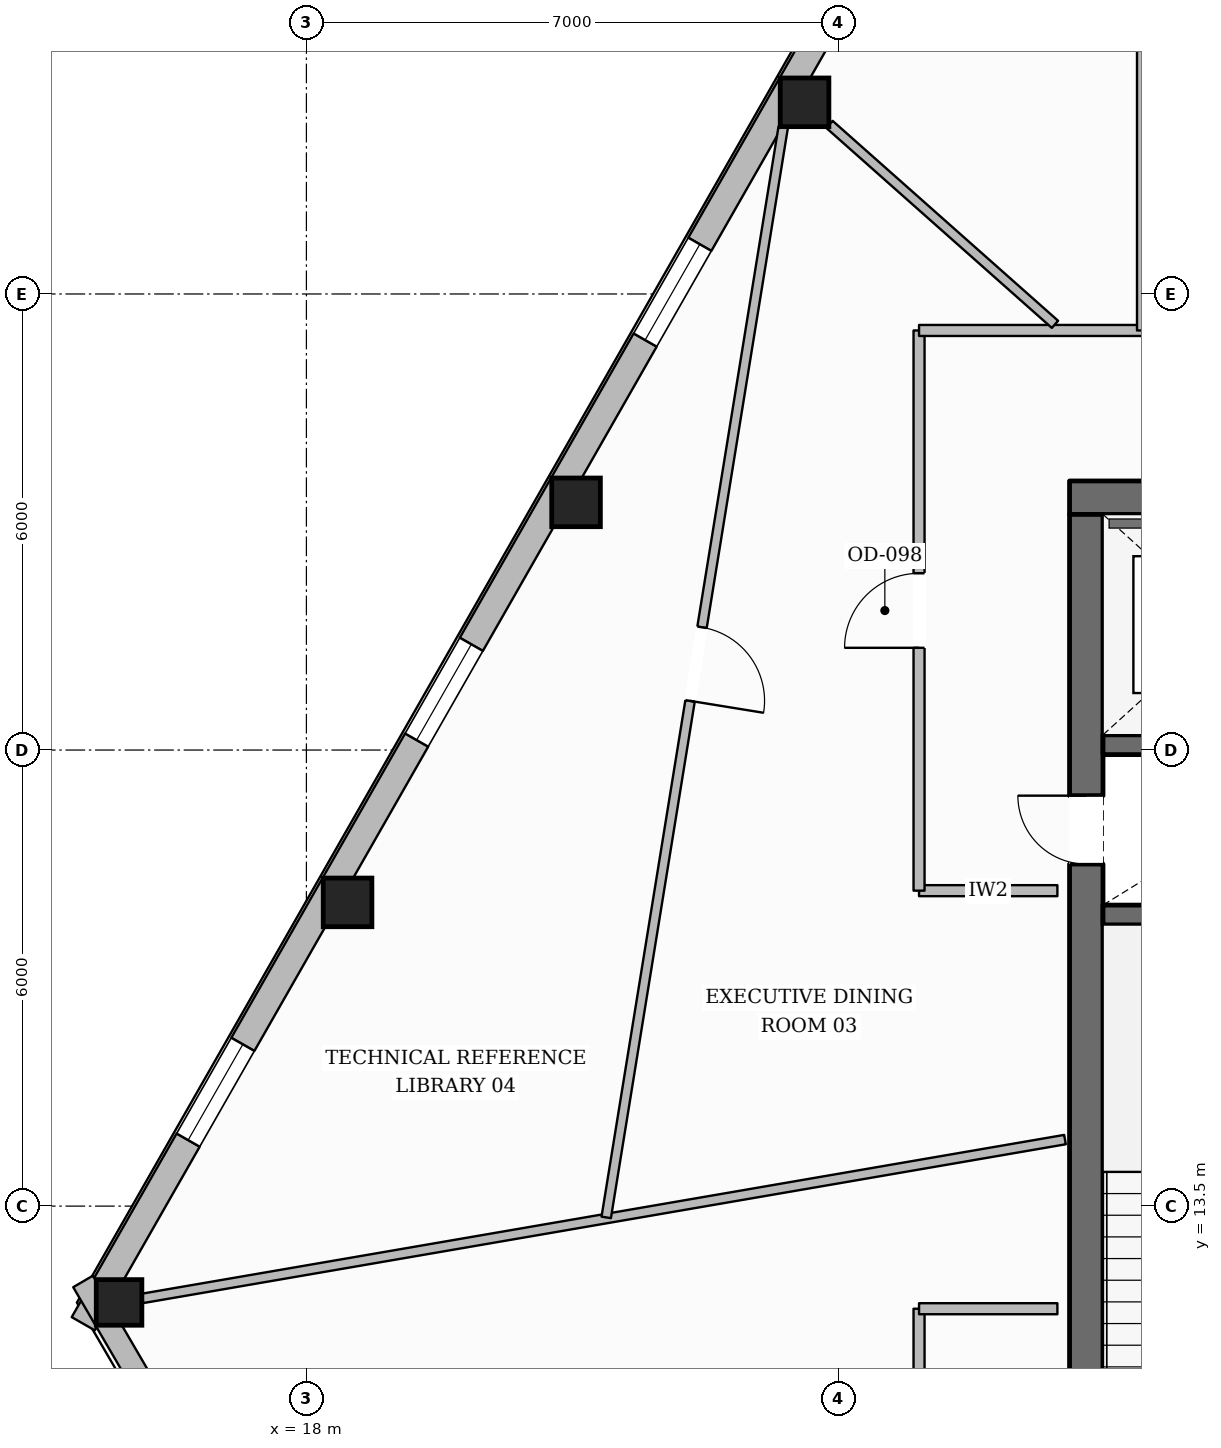
"""IFC4 building model, lengths in metres.
Left out: names, types, materials, properties, quantities, classifications, styles, units other than length and angle.
Written with IfcOpenShell. Run it as: python <this file> out.ifc"""

import sys

from ifc_helpers import new_model, si_unit, direction, frame, frame_2d, origin, origin_2d, place, context, subcontext, project, spatial, rectangle, hollow_rectangle, extrude, element, fill, save


model = new_model("IFC4")
c1 = context("Model", 3, precision=1e-05, world=origin(), true_north=direction((0.0, 1.0)))
c2 = subcontext(c1, "Body", "Model", "MODEL_VIEW")
j1 = project(units=[si_unit("LENGTHUNIT", "METRE"), si_unit("PLANEANGLEUNIT", "RADIAN")], contexts=[c1])
p1 = place(None, origin())
s1 = spatial("IfcSite", under=j1, at=p1, CompositionType="ELEMENT")
p2 = place(p1, origin())
s2 = spatial("IfcBuilding", under=s1, at=p2, CompositionType="ELEMENT")
p3 = place(p2, frame((0.0, 0.0, 180.4)))
s3 = spatial("IfcBuildingStorey", under=s2, at=p3, CompositionType="ELEMENT", Elevation=180.4)
p4 = place(p3, frame((28.04, 22.82, 0.0), z_axis=(0.0, 0.0, 1.0), x_axis=(1.0, 0.0, 0.0)))
e1 = element("IfcWall", 1, at=p4, inside=s3, PredefinedType="SOLIDWALL", context=c2, shape_type="SweptSolid", body=[
    extrude(rectangle(XDim=19.92, YDim=0.44, at=frame_2d((9.96, 0.0))), origin(), (0.0, 0.0, 1.0), 3.6),
])
p5 = place(p4, frame((6.235, 0.0, 0.0)))
e2 = element("IfcOpeningElement", 2, at=p5, cuts=e1, PredefinedType="OPENING", context=c2, shape_type="SweptSolid", body=[
    extrude(rectangle(XDim=1.05, YDim=2.15, at=frame_2d((0.525, 1.075))), frame((0.0, 0.23, 0.0), z_axis=(0.0, -1.0, 0.0), x_axis=(1.0, 0.0, 0.0)), (0.0, 0.0, 1.0), 0.46),
])
p6 = place(p4, frame((12.635, 0.0, 0.0)))
e3 = element("IfcOpeningElement", 3, at=p6, cuts=e1, PredefinedType="OPENING", context=c2, shape_type="SweptSolid", body=[
    extrude(rectangle(XDim=1.05, YDim=2.15, at=frame_2d((0.525, 1.075))), frame((0.0, 0.23, 0.0), z_axis=(0.0, -1.0, 0.0), x_axis=(1.0, 0.0, 0.0)), (0.0, 0.0, 1.0), 0.46),
])
p7 = place(p3, frame((28.26, 9.6, 0.0), z_axis=(0.0, 0.0, 1.0), x_axis=(0.0, 1.0, 0.0)))
e4 = element("IfcWall", 4, at=p7, inside=s3, PredefinedType="SOLIDWALL", context=c2, shape_type="SweptSolid", body=[
    extrude(rectangle(XDim=13.0, YDim=0.44, at=frame_2d((6.5, 0.0))), origin(), (0.0, 0.0, 1.0), 3.6),
])
p8 = place(p7, frame((0.2, 0.0, 0.0)))
e5 = element("IfcOpeningElement", 5, at=p8, cuts=e4, PredefinedType="OPENING", context=c2, shape_type="SweptSolid", body=[
    extrude(rectangle(XDim=1.1, YDim=2.15, at=frame_2d((0.55, 1.075))), frame((0.0, 0.23, 0.0), z_axis=(0.0, -1.0, 0.0), x_axis=(1.0, 0.0, 0.0)), (0.0, 0.0, 1.0), 0.46),
])
p9 = place(p7, frame((8.4, 0.0, 0.0)))
e6 = element("IfcOpeningElement", 6, at=p9, cuts=e4, PredefinedType="OPENING", context=c2, shape_type="SweptSolid", body=[
    extrude(rectangle(XDim=0.9, YDim=2.1, at=frame_2d((0.45, 1.05))), frame((0.0, 0.23, 0.0), z_axis=(0.0, -1.0, 0.0), x_axis=(1.0, 0.0, 0.0)), (0.0, 0.0, 1.0), 0.46),
])
for number, where, z_axis, x_axis in (
    (7, (28.48, 17.33, 0.0), (0.0, 0.0, 1.0), (1.0, 0.0, 0.0)),
    (8, (28.48, 19.57, 0.0), (0.0, 0.0, 1.0), (1.0, 0.0, 0.0)),
):
    element("IfcWall", number, at=place(p3, frame(where, z_axis=z_axis, x_axis=x_axis)), inside=s3, PredefinedType="SHEAR", context=c2, shape_type="SweptSolid", body=[
        extrude(rectangle(XDim=3.2, YDim=0.26, at=frame_2d((1.6, 0.0))), origin(), (0.0, 0.0, 1.0), 3.6),
    ])
for number, where, z_axis, x_axis in (
    (9, (24.554, 28.021, 0.0), (0.0, 0.0, 1.0), (1.0, 0.0, 0.0)),
    (10, (21.548, 22.759, 0.0), (0.0, 0.0, 1.0), (1.0, 0.0, 0.0)),
    (11, (18.542, 17.496, 0.0), (0.0, 0.0, 1.0), (1.0, 0.0, 0.0)),
):
    element("IfcColumn", number, at=place(p3, frame(where, z_axis=z_axis, x_axis=x_axis)), inside=s3, PredefinedType="COLUMN", context=c2, shape_type="SweptSolid", body=[
        extrude(hollow_rectangle(XDim=0.64, YDim=0.64, WallThickness=0.028, at=origin_2d()), origin(), (0.0, 0.0, 1.0), 3.6),
    ])
p10 = place(p3, frame((15.535, 12.233, 0.0), z_axis=(0.0, 0.0, 1.0), x_axis=(1.0, 0.0, 0.0)))
e12 = element("IfcColumn", 12, at=p10, inside=s3, PredefinedType="COLUMN", context=c2, shape_type="SweptSolid", body=[
    extrude(hollow_rectangle(XDim=0.6, YDim=0.6, WallThickness=0.028, at=origin_2d()), origin(), (0.0, 0.0, 1.0), 3.6),
])
p11 = place(p3, frame((15.064, 11.953, 0.0), z_axis=(0.0, 0.0, 1.0), x_axis=(0.495993114815, 0.86832645362, 0.0)))
e13 = element("IfcWall", 13, at=p11, inside=s3, PredefinedType="STANDARD", context=c2, shape_type="SweptSolid", body=[
    extrude(rectangle(XDim=37.324, YDim=0.35, at=frame_2d((18.662, 0.0))), origin(), (0.0, 0.0, 1.0), 3.132),
])
p12 = place(p11, frame((33.087, 0.0, 0.65)))
e14 = element("IfcOpeningElement", 14, at=p12, cuts=e13, PredefinedType="OPENING", context=c2, shape_type="SweptSolid", body=[
    extrude(rectangle(XDim=1.45, YDim=1.75, at=frame_2d((0.725, 0.875))), frame((0.0, 0.185, 0.0), z_axis=(0.0, -1.0, 0.0), x_axis=(1.0, 0.0, 0.0)), (0.0, 0.0, 1.0), 0.37),
])
p13 = place(p11, frame((27.026, 0.0, 0.65)))
e15 = element("IfcOpeningElement", 15, at=p13, cuts=e13, PredefinedType="OPENING", context=c2, shape_type="SweptSolid", body=[
    extrude(rectangle(XDim=1.45, YDim=1.75, at=frame_2d((0.725, 0.875))), frame((0.0, 0.185, 0.0), z_axis=(0.0, -1.0, 0.0), x_axis=(1.0, 0.0, 0.0)), (0.0, 0.0, 1.0), 0.37),
])
p14 = place(p11, frame((14.904, 0.0, 0.65)))
e16 = element("IfcOpeningElement", 16, at=p14, cuts=e13, PredefinedType="OPENING", context=c2, shape_type="SweptSolid", body=[
    extrude(rectangle(XDim=1.45, YDim=1.75, at=frame_2d((0.725, 0.875))), frame((0.0, 0.185, 0.0), z_axis=(0.0, -1.0, 0.0), x_axis=(1.0, 0.0, 0.0)), (0.0, 0.0, 1.0), 0.37),
])
p15 = place(p11, frame((8.844, 0.0, 0.65)))
e17 = element("IfcOpeningElement", 17, at=p15, cuts=e13, PredefinedType="OPENING", context=c2, shape_type="SweptSolid", body=[
    extrude(rectangle(XDim=1.45, YDim=1.75, at=frame_2d((0.725, 0.875))), frame((0.0, 0.185, 0.0), z_axis=(0.0, -1.0, 0.0), x_axis=(1.0, 0.0, 0.0)), (0.0, 0.0, 1.0), 0.37),
])
p16 = place(p11, frame((2.782, 0.0, 0.65)))
e18 = element("IfcOpeningElement", 18, at=p16, cuts=e13, PredefinedType="OPENING", context=c2, shape_type="SweptSolid", body=[
    extrude(rectangle(XDim=1.45, YDim=1.75, at=frame_2d((0.725, 0.875))), frame((0.0, 0.185, 0.0), z_axis=(0.0, -1.0, 0.0), x_axis=(1.0, 0.0, 0.0)), (0.0, 0.0, 1.0), 0.37),
])
p17 = place(p3, frame((20.12, 3.839, 0.0), z_axis=(0.0, 0.0, 1.0), x_axis=(-0.503937564299, 0.863740083178, 0.0)))
e19 = element("IfcWall", 19, at=p17, inside=s3, PredefinedType="STANDARD", context=c2, shape_type="SweptSolid", body=[
    extrude(rectangle(XDim=10.038, YDim=0.3, at=frame_2d((5.019, 0.0))), origin(), (0.0, 0.0, 1.0), 3.132),
])
p18 = place(p17, frame((4.494, 0.0, 0.65)))
e20 = element("IfcOpeningElement", 20, at=p18, cuts=e19, PredefinedType="OPENING", context=c2, shape_type="SweptSolid", body=[
    extrude(rectangle(XDim=1.05, YDim=1.7, at=frame_2d((0.525, 0.85))), frame((0.0, 0.16, 0.0), z_axis=(0.0, -1.0, 0.0), x_axis=(1.0, 0.0, 0.0)), (0.0, 0.0, 1.0), 0.32),
])
p19 = place(p3, frame((27.88, 17.65, 0.0), z_axis=(0.0, 0.0, 1.0), x_axis=(-1.0, 0.0, 0.0)))
e21 = element("IfcWall", 21, at=p19, inside=s3, PredefinedType="PARTITIONING", context=c2, shape_type="SweptSolid", body=[
    extrude(rectangle(XDim=1.82, YDim=0.145, at=frame_2d((0.91, 0.0))), origin(), (0.0, 0.0, 1.0), 3.141),
])
p20 = place(p3, frame((26.06, 17.65, 0.0), z_axis=(0.0, 0.0, 1.0), x_axis=(0.0, 1.0, 0.0)))
e22 = element("IfcWall", 22, at=p20, inside=s3, PredefinedType="PARTITIONING", context=c2, shape_type="SweptSolid", body=[
    extrude(rectangle(XDim=7.37, YDim=0.145, at=frame_2d((3.685, 0.0))), origin(), (0.0, 0.0, 1.0), 3.339),
])
p21 = place(p20, frame((3.195, 0.0, 0.0)))
e23 = element("IfcOpeningElement", 23, at=p21, cuts=e22, PredefinedType="OPENING", context=c2, shape_type="SweptSolid", body=[
    extrude(rectangle(XDim=0.98, YDim=2.15, at=frame_2d((0.49, 1.075))), frame((0.0, 0.083, 0.0), z_axis=(0.0, -1.0, 0.0), x_axis=(1.0, 0.0, 0.0)), (0.0, 0.0, 1.0), 0.165),
])
p22 = place(p3, frame((26.06, 25.02, 0.0), z_axis=(0.0, 0.0, 1.0), x_axis=(1.0, 0.0, 0.0)))
e24 = element("IfcWall", 24, at=p22, inside=s3, PredefinedType="PARTITIONING", context=c2, shape_type="SweptSolid", body=[
    extrude(rectangle(XDim=2.94, YDim=0.145, at=frame_2d((1.47, 0.0))), origin(), (0.0, 0.0, 1.0), 3.6),
])
p23 = place(p3, frame((29.0, 25.02, 0.0), z_axis=(0.0, 0.0, 1.0), x_axis=(0.0, 1.0, 0.0)))
e25 = element("IfcWall", 25, at=p23, inside=s3, PredefinedType="PARTITIONING", context=c2, shape_type="SweptSolid", body=[
    extrude(rectangle(XDim=8.662, YDim=0.145, at=frame_2d((4.331, 0.0))), origin(), (0.0, 0.0, 1.0), 3.6),
])
p24 = place(p3, frame((26.06, 7.18, 0.0), z_axis=(0.0, 0.0, 1.0), x_axis=(0.0, 1.0, 0.0)))
e26 = element("IfcWall", 26, at=p24, inside=s3, PredefinedType="PARTITIONING", context=c2, shape_type="SweptSolid", body=[
    extrude(rectangle(XDim=4.97, YDim=0.145, at=frame_2d((2.485, 0.0))), origin(), (0.0, 0.0, 1.0), 3.6),
])
p25 = place(p24, frame((1.785, 0.0, 0.0)))
e27 = element("IfcOpeningElement", 27, at=p25, cuts=e26, PredefinedType="OPENING", context=c2, shape_type="SweptSolid", body=[
    extrude(rectangle(XDim=1.4, YDim=2.2, at=frame_2d((0.7, 1.1))), frame((0.0, 0.083, 0.0), z_axis=(0.0, -1.0, 0.0), x_axis=(1.0, 0.0, 0.0)), (0.0, 0.0, 1.0), 0.165),
])
p26 = place(p3, frame((26.06, 12.15, 0.0), z_axis=(0.0, 0.0, 1.0), x_axis=(1.0, 0.0, 0.0)))
e28 = element("IfcWall", 28, at=p26, inside=s3, PredefinedType="PARTITIONING", context=c2, shape_type="SweptSolid", body=[
    extrude(rectangle(XDim=1.82, YDim=0.145, at=frame_2d((0.91, 0.0))), origin(), (0.0, 0.0, 1.0), 3.141),
])
p27 = place(p3, frame((27.848, 25.101, 0.0), z_axis=(0.0, 0.0, 1.0), x_axis=(-0.748288582972, 0.66337334631, 0.0)))
e29 = element("IfcWall", 29, at=p27, inside=s3, PredefinedType="PARTITIONING", context=c2, shape_type="SweptSolid", body=[
    extrude(rectangle(XDim=3.965, YDim=0.125, at=frame_2d((1.982, 0.0))), origin(), (0.0, 0.0, 1.0), 3.141),
])
p28 = place(p3, frame((27.98, 14.375, 0.0), z_axis=(0.0, 0.0, 1.0), x_axis=(-0.9855033492, -0.169655971646, 0.0)))
e30 = element("IfcWall", 30, at=p28, inside=s3, PredefinedType="PARTITIONING", context=c2, shape_type="SweptSolid", body=[
    extrude(rectangle(XDim=12.315, YDim=0.125, at=frame_2d((6.158, 0.0))), origin(), (0.0, 0.0, 1.0), 3.141),
])
p29 = place(p3, frame((24.273, 27.694, 0.0), z_axis=(0.0, 0.0, 1.0), x_axis=(-0.160245052552, -0.987077263, 0.0)))
e31 = element("IfcWall", 31, at=p29, inside=s3, PredefinedType="PARTITIONING", context=c2, shape_type="SweptSolid", body=[
    extrude(rectangle(XDim=14.53, YDim=0.125, at=frame_2d((7.265, 0.0))), origin(), (0.0, 0.0, 1.0), 3.135),
])
p30 = place(p29, frame((6.665, 0.0, 0.0)))
e32 = element("IfcOpeningElement", 32, at=p30, cuts=e31, PredefinedType="OPENING", context=c2, shape_type="SweptSolid", body=[
    extrude(rectangle(XDim=0.98, YDim=2.15, at=frame_2d((0.49, 1.075))), frame((0.0, 0.073, 0.0), z_axis=(0.0, -1.0, 0.0), x_axis=(1.0, 0.0, 0.0)), (0.0, 0.0, 1.0), 0.145),
])
p31 = place(p14, origin())
e33 = element("IfcWindow", 33, at=p31, inside=s3, PartitioningType="SINGLE_PANEL", PredefinedType="WINDOW", context=c2, shape_type="SweptSolid", body=[
    extrude(rectangle(XDim=1.45, YDim=1.75, at=frame_2d((0.725, 0.875))), frame((0.0, 0.03, 0.0), z_axis=(0.0, -1.0, 0.0), x_axis=(1.0, 0.0, 0.0)), (0.0, 0.0, 1.0), 0.06),
])
fill(e16, e33)
p32 = place(p15, origin())
e34 = element("IfcWindow", 34, at=p32, inside=s3, PartitioningType="SINGLE_PANEL", PredefinedType="WINDOW", context=c2, shape_type="SweptSolid", body=[
    extrude(rectangle(XDim=1.45, YDim=1.75, at=frame_2d((0.725, 0.875))), frame((0.0, 0.03, 0.0), z_axis=(0.0, -1.0, 0.0), x_axis=(1.0, 0.0, 0.0)), (0.0, 0.0, 1.0), 0.06),
])
fill(e17, e34)
p33 = place(p16, origin())
e35 = element("IfcWindow", 35, at=p33, inside=s3, PartitioningType="SINGLE_PANEL", PredefinedType="WINDOW", context=c2, shape_type="SweptSolid", body=[
    extrude(rectangle(XDim=1.45, YDim=1.75, at=frame_2d((0.725, 0.875))), frame((0.0, 0.03, 0.0), z_axis=(0.0, -1.0, 0.0), x_axis=(1.0, 0.0, 0.0)), (0.0, 0.0, 1.0), 0.06),
])
fill(e18, e35)
p34 = place(p9, origin())
e36 = element("IfcDoor", 36, at=p34, inside=s3, OperationType="SINGLE_SWING_RIGHT", PredefinedType="DOOR", context=c2, shape_type="SweptSolid", body=[
    extrude(rectangle(XDim=0.9, YDim=2.1, at=frame_2d((0.45, 1.05))), frame((0.0, 0.025, 0.0), z_axis=(0.0, -1.0, 0.0), x_axis=(1.0, 0.0, 0.0)), (0.0, 0.0, 1.0), 0.05),
])
fill(e6, e36)
p35 = place(p21, origin())
e37 = element("IfcDoor", 37, at=p35, inside=s3, OperationType="SINGLE_SWING_LEFT", PredefinedType="DOOR", context=c2, shape_type="SweptSolid", body=[
    extrude(rectangle(XDim=0.98, YDim=2.15, at=frame_2d((0.49, 1.075))), frame((0.0, 0.025, 0.0), z_axis=(0.0, -1.0, 0.0), x_axis=(1.0, 0.0, 0.0)), (0.0, 0.0, 1.0), 0.05),
])
fill(e23, e37)
p36 = place(p30, origin())
e38 = element("IfcDoor", 38, at=p36, inside=s3, OperationType="SINGLE_SWING_RIGHT", PredefinedType="DOOR", context=c2, shape_type="SweptSolid", body=[
    extrude(rectangle(XDim=0.98, YDim=2.15, at=frame_2d((0.49, 1.075))), frame((0.0, 0.025, 0.0), z_axis=(0.0, -1.0, 0.0), x_axis=(1.0, 0.0, 0.0)), (0.0, 0.0, 1.0), 0.05),
])
fill(e32, e38)
save(model, sys.argv[1])
